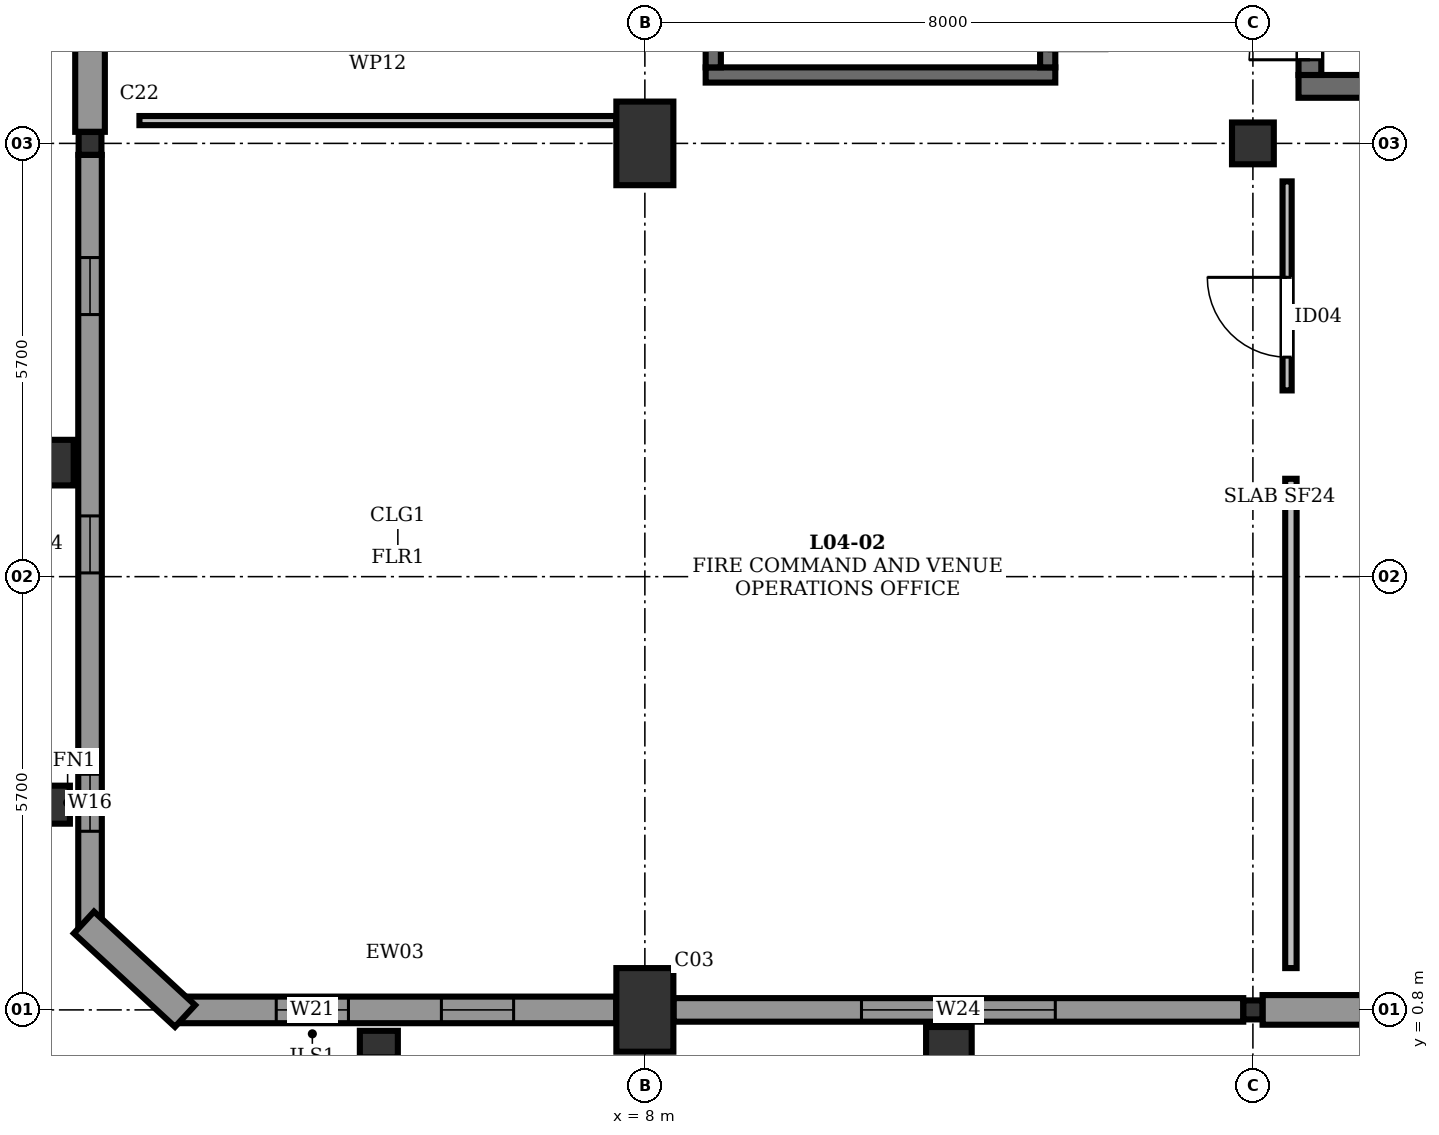
"""IFC4 building model, lengths in metres.
Left out: names, types, materials, properties, quantities, classifications, styles, units other than length and angle.
Written with IfcOpenShell. Run it as: python <this file> out.ifc"""

import sys

from ifc_helpers import new_model, si_unit, direction, frame, frame_2d, origin, origin_2d, place, context, subcontext, project, spatial, rectangle, hollow_rectangle, extrude, element, fill, save


model = new_model("IFC4")
c1 = context("Model", 3, precision=1e-05, world=origin(), true_north=direction((0.0, 1.0)))
c2 = subcontext(c1, "Body", "Model", "MODEL_VIEW")
j1 = project(units=[si_unit("LENGTHUNIT", "METRE"), si_unit("PLANEANGLEUNIT", "RADIAN")], contexts=[c1])
p1 = place(None, origin())
s1 = spatial("IfcSite", under=j1, at=p1, CompositionType="ELEMENT")
p2 = place(p1, origin())
s2 = spatial("IfcBuilding", under=s1, at=p2, CompositionType="ELEMENT")
p3 = place(p2, frame((0.0, 0.0, 19.2)))
s3 = spatial("IfcBuildingStorey", under=s2, at=p3, CompositionType="ELEMENT", Elevation=19.2)
p4 = place(p3, frame((0.7, 12.2, 0.0), z_axis=(0.0, 0.0, 1.0), x_axis=(1.0, 0.0, 0.0)))
e1 = element("IfcColumn", 1, at=p4, inside=s3, PredefinedType="COLUMN", context=c2, shape_type="SweptSolid", body=[
    extrude(hollow_rectangle(XDim=0.3, YDim=0.3, WallThickness=0.012, at=origin_2d()), origin(), (0.0, 0.0, 1.0), 4.8),
])
for number, where, z_axis, x_axis in (
    (2, (8.0, 0.8, 0.0), (0.0, 0.0, 1.0), (1.0, 0.0, 0.0)),
    (3, (8.0, 12.2, 0.0), (0.0, 0.0, 1.0), (1.0, 0.0, 0.0)),
):
    element("IfcColumn", number, at=place(p3, frame(where, z_axis=z_axis, x_axis=x_axis)), inside=s3, PredefinedType="COLUMN", context=c2, shape_type="SweptSolid", body=[
        extrude(rectangle(XDim=0.75, YDim=1.1, at=origin_2d()), origin(), (0.0, 0.0, 1.0), 4.8),
    ])
p5 = place(p3, frame((16.0, 0.8, 0.0), z_axis=(0.0, 0.0, 1.0), x_axis=(1.0, 0.0, 0.0)))
e4 = element("IfcColumn", 4, at=p5, inside=s3, PredefinedType="COLUMN", context=c2, shape_type="SweptSolid", body=[
    extrude(hollow_rectangle(XDim=0.25, YDim=0.25, WallThickness=0.012, at=origin_2d()), origin(), (0.0, 0.0, 1.0), 4.8),
])
p6 = place(p3, frame((16.0, 12.2, 0.0), z_axis=(0.0, 0.0, 1.0), x_axis=(1.0, 0.0, 0.0)))
e5 = element("IfcColumn", 5, at=p6, inside=s3, PredefinedType="COLUMN", context=c2, shape_type="SweptSolid", body=[
    extrude(rectangle(XDim=0.55, YDim=0.55, at=origin_2d()), origin(), (0.0, 0.0, 1.0), 4.8),
])
p7 = place(p3, frame((0.26, 3.5, 0.0), z_axis=(0.0, 0.0, 1.0), x_axis=(1.0, 0.0, 0.0)))
e6 = element("IfcColumn", 6, at=p7, inside=s3, PredefinedType="PILASTER", context=c2, shape_type="SweptSolid", body=[
    extrude(rectangle(XDim=0.35, YDim=0.5, at=origin_2d()), origin(), (0.0, 0.0, 1.0), 5.65),
])
p8 = place(p3, frame((0.26, 8.0, 0.0), z_axis=(0.0, 0.0, 1.0), x_axis=(1.0, 0.0, 0.0)))
e7 = element("IfcColumn", 7, at=p8, inside=s3, PredefinedType="PILASTER", context=c2, shape_type="SweptSolid", body=[
    extrude(rectangle(XDim=0.45, YDim=0.6, at=origin_2d()), origin(), (0.0, 0.0, 1.0), 5.65),
])
p9 = place(p3, frame((4.5, 0.35, 0.0), z_axis=(0.0, 0.0, 1.0), x_axis=(0.0, 1.0, 0.0)))
e8 = element("IfcColumn", 8, at=p9, inside=s3, PredefinedType="PILASTER", context=c2, shape_type="SweptSolid", body=[
    extrude(rectangle(XDim=0.35, YDim=0.5, at=origin_2d()), origin(), (0.0, 0.0, 1.0), 5.65),
])
p10 = place(p3, frame((12.0, 0.35, 0.0), z_axis=(0.0, 0.0, 1.0), x_axis=(0.0, 1.0, 0.0)))
e9 = element("IfcColumn", 9, at=p10, inside=s3, PredefinedType="PILASTER", context=c2, shape_type="SweptSolid", body=[
    extrude(rectangle(XDim=0.45, YDim=0.6, at=origin_2d()), origin(), (0.0, 0.0, 1.0), 5.65),
])
p11 = place(p3, frame((0.7, 1.8, 0.0), z_axis=(0.0, 0.0, 1.0), x_axis=(0.0, 1.0, 0.0)))
e10 = element("IfcWall", 10, at=p11, inside=s3, PredefinedType="STANDARD", context=c2, shape_type="SweptSolid", body=[
    extrude(rectangle(XDim=10.248, YDim=0.31, at=frame_2d((5.124, 0.0))), origin(), (0.0, 0.0, 1.0), 3.645),
])
p12 = place(p11, frame((1.35, 0.0, 0.75)))
e11 = element("IfcOpeningElement", 11, at=p12, cuts=e10, PredefinedType="OPENING", context=c2, shape_type="SweptSolid", body=[
    extrude(rectangle(XDim=0.75, YDim=2.35, at=frame_2d((0.375, 1.175))), frame((0.0, 0.167, 0.0), z_axis=(0.0, -1.0, 0.0), x_axis=(1.0, 0.0, 0.0)), (0.0, 0.0, 1.0), 0.334),
])
p13 = place(p11, frame((4.749, 0.0, 0.75)))
e12 = element("IfcOpeningElement", 12, at=p13, cuts=e10, PredefinedType="OPENING", context=c2, shape_type="SweptSolid", body=[
    extrude(rectangle(XDim=0.75, YDim=2.35, at=frame_2d((0.375, 1.175))), frame((0.0, 0.167, 0.0), z_axis=(0.0, -1.0, 0.0), x_axis=(1.0, 0.0, 0.0)), (0.0, 0.0, 1.0), 0.334),
])
p14 = place(p11, frame((8.148, 0.0, 0.75)))
e13 = element("IfcOpeningElement", 13, at=p14, cuts=e10, PredefinedType="OPENING", context=c2, shape_type="SweptSolid", body=[
    extrude(rectangle(XDim=0.75, YDim=2.35, at=frame_2d((0.375, 1.175))), frame((0.0, 0.167, 0.0), z_axis=(0.0, -1.0, 0.0), x_axis=(1.0, 0.0, 0.0)), (0.0, 0.0, 1.0), 0.334),
])
p15 = place(p3, frame((0.7, 12.352, 0.0), z_axis=(0.0, 0.0, 1.0), x_axis=(0.0, 1.0, 0.0)))
e14 = element("IfcWall", 14, at=p15, inside=s3, PredefinedType="STANDARD", context=c2, shape_type="SweptSolid", body=[
    extrude(rectangle(XDim=10.048, YDim=0.39, at=frame_2d((5.024, 0.0))), origin(), (0.0, 0.0, 1.0), 3.645),
])
p16 = place(p15, frame((1.35, 0.0, 0.75)))
e15 = element("IfcOpeningElement", 15, at=p16, cuts=e14, PredefinedType="OPENING", context=c2, shape_type="SweptSolid", body=[
    extrude(rectangle(XDim=2.75, YDim=2.35, at=frame_2d((1.375, 1.175))), frame((0.0, 0.207, 0.0), z_axis=(0.0, -1.0, 0.0), x_axis=(1.0, 0.0, 0.0)), (0.0, 0.0, 1.0), 0.414),
])
p17 = place(p15, frame((5.948, 0.0, 0.75)))
e16 = element("IfcOpeningElement", 16, at=p17, cuts=e14, PredefinedType="OPENING", context=c2, shape_type="SweptSolid", body=[
    extrude(rectangle(XDim=2.75, YDim=2.35, at=frame_2d((1.375, 1.175))), frame((0.0, 0.207, 0.0), z_axis=(0.0, -1.0, 0.0), x_axis=(1.0, 0.0, 0.0)), (0.0, 0.0, 1.0), 0.414),
])
p18 = place(p3, frame((1.8, 0.8, 0.0), z_axis=(0.0, 0.0, 1.0), x_axis=(1.0, 0.0, 0.0)))
e17 = element("IfcWall", 17, at=p18, inside=s3, PredefinedType="STANDARD", context=c2, shape_type="SweptSolid", body=[
    extrude(rectangle(XDim=5.823, YDim=0.35, at=frame_2d((2.912, 0.0))), origin(), (0.0, 0.0, 1.0), 3.845),
])
p19 = place(p18, frame((1.35, 0.0, 0.75)))
e18 = element("IfcOpeningElement", 18, at=p19, cuts=e17, PredefinedType="OPENING", context=c2, shape_type="SweptSolid", body=[
    extrude(rectangle(XDim=0.95, YDim=1.55, at=frame_2d((0.475, 0.775))), frame((0.0, 0.187, 0.0), z_axis=(0.0, -1.0, 0.0), x_axis=(1.0, 0.0, 0.0)), (0.0, 0.0, 1.0), 0.374),
])
p20 = place(p18, frame((3.523, 0.0, 0.75)))
e19 = element("IfcOpeningElement", 19, at=p20, cuts=e17, PredefinedType="OPENING", context=c2, shape_type="SweptSolid", body=[
    extrude(rectangle(XDim=0.95, YDim=1.55, at=frame_2d((0.475, 0.775))), frame((0.0, 0.187, 0.0), z_axis=(0.0, -1.0, 0.0), x_axis=(1.0, 0.0, 0.0)), (0.0, 0.0, 1.0), 0.374),
])
p21 = place(p3, frame((8.377, 0.8, 0.0), z_axis=(0.0, 0.0, 1.0), x_axis=(1.0, 0.0, 0.0)))
e20 = element("IfcWall", 20, at=p21, inside=s3, PredefinedType="STANDARD", context=c2, shape_type="SweptSolid", body=[
    extrude(rectangle(XDim=7.496, YDim=0.31, at=frame_2d((3.748, 0.0))), origin(), (0.0, 0.0, 1.0), 3.845),
])
p22 = place(p21, frame((2.473, 0.0, 0.75)))
e21 = element("IfcOpeningElement", 21, at=p22, cuts=e20, PredefinedType="OPENING", context=c2, shape_type="SweptSolid", body=[
    extrude(rectangle(XDim=2.55, YDim=1.55, at=frame_2d((1.275, 0.775))), frame((0.0, 0.167, 0.0), z_axis=(0.0, -1.0, 0.0), x_axis=(1.0, 0.0, 0.0)), (0.0, 0.0, 1.0), 0.334),
])
p23 = place(p3, frame((16.127, 0.8, 0.0), z_axis=(0.0, 0.0, 1.0), x_axis=(1.0, 0.0, 0.0)))
e22 = element("IfcWall", 22, at=p23, inside=s3, PredefinedType="STANDARD", context=c2, shape_type="SweptSolid", body=[
    extrude(rectangle(XDim=7.496, YDim=0.39, at=frame_2d((3.748, 0.0))), origin(), (0.0, 0.0, 1.0), 3.845),
])
p24 = place(p23, frame((1.35, 0.0, 0.75)))
e23 = element("IfcOpeningElement", 23, at=p24, cuts=e22, PredefinedType="OPENING", context=c2, shape_type="SweptSolid", body=[
    extrude(rectangle(XDim=1.85, YDim=2.5, at=frame_2d((0.925, 1.25))), frame((0.0, 0.207, 0.0), z_axis=(0.0, -1.0, 0.0), x_axis=(1.0, 0.0, 0.0)), (0.0, 0.0, 1.0), 0.414),
])
p25 = place(p23, frame((4.296, 0.0, 0.75)))
e24 = element("IfcOpeningElement", 24, at=p25, cuts=e22, PredefinedType="OPENING", context=c2, shape_type="SweptSolid", body=[
    extrude(rectangle(XDim=1.85, YDim=2.5, at=frame_2d((0.925, 1.25))), frame((0.0, 0.207, 0.0), z_axis=(0.0, -1.0, 0.0), x_axis=(1.0, 0.0, 0.0)), (0.0, 0.0, 1.0), 0.414),
])
p26 = place(p3, frame((0.62, 1.95, 0.0), z_axis=(0.0, 0.0, 1.0), x_axis=(0.734131351327, -0.679007480812, 0.0)))
e25 = element("IfcWall", 25, at=p26, inside=s3, PredefinedType="STANDARD", context=c2, shape_type="SweptSolid", body=[
    extrude(rectangle(XDim=1.812, YDim=0.39, at=frame_2d((0.906, 0.0))), origin(), (0.0, 0.0, 1.0), 4.4),
])
p27 = place(p3, frame((16.6, 12.95, 0.0), z_axis=(0.0, 0.0, 1.0), x_axis=(1.0, 0.0, 0.0)))
e26 = element("IfcWall", 26, at=p27, inside=s3, PredefinedType="SHEAR", context=c2, shape_type="SweptSolid", body=[
    extrude(rectangle(XDim=6.8, YDim=0.3, at=frame_2d((3.4, 0.0))), origin(), (0.0, 0.0, 1.0), 4.56),
])
p28 = place(p3, frame((16.75, 13.1, 0.0), z_axis=(0.0, 0.0, 1.0), x_axis=(0.0, 1.0, 0.0)))
e27 = element("IfcWall", 27, at=p28, inside=s3, PredefinedType="SHEAR", context=c2, shape_type="SweptSolid", body=[
    extrude(rectangle(XDim=9.6, YDim=0.3, at=frame_2d((4.8, 0.0))), origin(), (0.0, 0.0, 1.0), 4.56),
])
p29 = place(p28, frame((0.2, 0.0, 0.0)))
e28 = element("IfcOpeningElement", 28, at=p29, cuts=e27, PredefinedType="OPENING", context=c2, shape_type="SweptSolid", body=[
    extrude(rectangle(XDim=1.6, YDim=2.2, at=frame_2d((0.8, 1.1))), frame((0.0, 0.162, 0.0), z_axis=(0.0, -1.0, 0.0), x_axis=(1.0, 0.0, 0.0)), (0.0, 0.0, 1.0), 0.324),
])
p30 = place(p3, frame((8.8, 13.1, 0.0), z_axis=(0.0, 0.0, 1.0), x_axis=(1.0, 0.0, 0.0)))
e29 = element("IfcWall", 29, at=p30, inside=s3, PredefinedType="SOLIDWALL", context=c2, shape_type="SweptSolid", body=[
    extrude(rectangle(XDim=4.6, YDim=0.2, at=frame_2d((2.3, 0.0))), origin(), (0.0, 0.0, 1.0), 4.56),
])
p31 = place(p3, frame((8.9, 13.2, 0.0), z_axis=(0.0, 0.0, 1.0), x_axis=(0.0, 1.0, 0.0)))
e30 = element("IfcWall", 30, at=p31, inside=s3, PredefinedType="SOLIDWALL", context=c2, shape_type="SweptSolid", body=[
    extrude(rectangle(XDim=8.8, YDim=0.2, at=frame_2d((4.4, 0.0))), origin(), (0.0, 0.0, 1.0), 4.56),
])
p32 = place(p3, frame((13.3, 13.2, 0.0), z_axis=(0.0, 0.0, 1.0), x_axis=(0.0, 1.0, 0.0)))
e31 = element("IfcWall", 31, at=p32, inside=s3, PredefinedType="SOLIDWALL", context=c2, shape_type="SweptSolid", body=[
    extrude(rectangle(XDim=8.8, YDim=0.2, at=frame_2d((4.4, 0.0))), origin(), (0.0, 0.0, 1.0), 4.56),
])
p33 = place(p32, frame((0.22, 0.0, 0.0)))
e32 = element("IfcOpeningElement", 32, at=p33, cuts=e31, PredefinedType="OPENING", context=c2, shape_type="SweptSolid", body=[
    extrude(rectangle(XDim=1.6, YDim=2.2, at=frame_2d((0.8, 1.1))), frame((0.0, 0.112, 0.0), z_axis=(0.0, -1.0, 0.0), x_axis=(1.0, 0.0, 0.0)), (0.0, 0.0, 1.0), 0.224),
])
p34 = place(p3, frame((16.45, 8.95, 0.0), z_axis=(0.0, 0.0, 1.0), x_axis=(0.0, 1.0, 0.0)))
e33 = element("IfcWall", 33, at=p34, inside=s3, PredefinedType="PARTITIONING", context=c2, shape_type="SweptSolid", body=[
    extrude(rectangle(XDim=2.75, YDim=0.12, at=frame_2d((1.375, 0.0))), origin(), (0.0, 0.0, 1.0), 3.845),
])
p35 = place(p34, frame((0.438, 0.0, 0.0)))
e34 = element("IfcOpeningElement", 34, at=p35, cuts=e33, PredefinedType="OPENING", context=c2, shape_type="SweptSolid", body=[
    extrude(rectangle(XDim=1.05, YDim=2.15, at=frame_2d((0.525, 1.075))), frame((0.0, 0.072, 0.0), z_axis=(0.0, -1.0, 0.0), x_axis=(1.0, 0.0, 0.0)), (0.0, 0.0, 1.0), 0.144),
])
p36 = place(p3, frame((1.35, 12.5, 0.0), z_axis=(0.0, 0.0, 1.0), x_axis=(1.0, 0.0, 0.0)))
e35 = element("IfcWall", 35, at=p36, inside=s3, PredefinedType="PARTITIONING", context=c2, shape_type="SweptSolid", body=[
    extrude(rectangle(XDim=6.273, YDim=0.12, at=frame_2d((3.136, 0.0))), origin(), (0.0, 0.0, 1.0), 3.645),
])
p37 = place(p3, frame((16.5, 1.35, 0.0), z_axis=(0.0, 0.0, 1.0), x_axis=(0.0, 1.0, 0.0)))
e36 = element("IfcWall", 36, at=p37, inside=s3, PredefinedType="PARTITIONING", context=c2, shape_type="SweptSolid", body=[
    extrude(rectangle(XDim=6.438, YDim=0.15, at=frame_2d((3.219, 0.0))), origin(), (0.0, 0.0, 1.0), 4.56),
])
p38 = place(p12, origin())
e37 = element("IfcWindow", 37, at=p38, inside=s3, PartitioningType="SINGLE_PANEL", PredefinedType="WINDOW", context=c2, shape_type="SweptSolid", body=[
    extrude(rectangle(XDim=0.75, YDim=2.35, at=frame_2d((0.375, 1.175))), frame((0.0, 0.08, 0.0), z_axis=(0.0, -1.0, 0.0), x_axis=(1.0, 0.0, 0.0)), (0.0, 0.0, 1.0), 0.06),
])
fill(e11, e37)
p39 = place(p13, origin())
e38 = element("IfcWindow", 38, at=p39, inside=s3, PartitioningType="SINGLE_PANEL", PredefinedType="WINDOW", context=c2, shape_type="SweptSolid", body=[
    extrude(rectangle(XDim=0.75, YDim=2.35, at=frame_2d((0.375, 1.175))), frame((0.0, 0.08, 0.0), z_axis=(0.0, -1.0, 0.0), x_axis=(1.0, 0.0, 0.0)), (0.0, 0.0, 1.0), 0.06),
])
fill(e12, e38)
p40 = place(p14, origin())
e39 = element("IfcWindow", 39, at=p40, inside=s3, PartitioningType="SINGLE_PANEL", PredefinedType="WINDOW", context=c2, shape_type="SweptSolid", body=[
    extrude(rectangle(XDim=0.75, YDim=2.35, at=frame_2d((0.375, 1.175))), frame((0.0, 0.08, 0.0), z_axis=(0.0, -1.0, 0.0), x_axis=(1.0, 0.0, 0.0)), (0.0, 0.0, 1.0), 0.06),
])
fill(e13, e39)
p41 = place(p19, origin())
e40 = element("IfcWindow", 40, at=p41, inside=s3, PartitioningType="SINGLE_PANEL", PredefinedType="WINDOW", context=c2, shape_type="SweptSolid", body=[
    extrude(rectangle(XDim=0.95, YDim=1.55, at=frame_2d((0.475, 0.775))), frame((0.0, 0.08, 0.0), z_axis=(0.0, -1.0, 0.0), x_axis=(1.0, 0.0, 0.0)), (0.0, 0.0, 1.0), 0.06),
])
fill(e18, e40)
p42 = place(p20, origin())
e41 = element("IfcWindow", 41, at=p42, inside=s3, PartitioningType="SINGLE_PANEL", PredefinedType="WINDOW", context=c2, shape_type="SweptSolid", body=[
    extrude(rectangle(XDim=0.95, YDim=1.55, at=frame_2d((0.475, 0.775))), frame((0.0, 0.08, 0.0), z_axis=(0.0, -1.0, 0.0), x_axis=(1.0, 0.0, 0.0)), (0.0, 0.0, 1.0), 0.06),
])
fill(e19, e41)
p43 = place(p22, origin())
e42 = element("IfcWindow", 42, at=p43, inside=s3, PartitioningType="TRIPLE_PANEL_VERTICAL", PredefinedType="WINDOW", context=c2, shape_type="SweptSolid", body=[
    extrude(rectangle(XDim=2.55, YDim=1.55, at=frame_2d((1.275, 0.775))), frame((0.0, 0.08, 0.0), z_axis=(0.0, -1.0, 0.0), x_axis=(1.0, 0.0, 0.0)), (0.0, 0.0, 1.0), 0.06),
])
fill(e21, e42)
p44 = place(p2, frame((0.0, 0.0, 27.0)))
p45 = place(p44, frame((0.0, 0.0, -3.24)))
p46 = place(p45, frame((10.0, 6.4, 0.0)))
p47 = place(p46, frame((0.0, 0.0, 0.19)))
e43 = element("IfcWindow", 43, at=p47, inside=s3, PartitioningType="SINGLE_PANEL", PredefinedType="SKYLIGHT", context=c2, shape_type="SweptSolid", body=[
    extrude(rectangle(XDim=2.2, YDim=3.4, at=origin_2d()), origin(), (0.0, 0.0, 1.0), 0.05),
])
p48 = place(p29, origin())
e44 = element("IfcDoor", 44, at=p48, inside=s3, OperationType="DOUBLE_DOOR_SINGLE_SWING", PredefinedType="DOOR", context=c2, shape_type="SweptSolid", body=[
    extrude(rectangle(XDim=1.6, YDim=2.2, at=frame_2d((0.8, 1.1))), frame((0.0, 0.025, 0.0), z_axis=(0.0, -1.0, 0.0), x_axis=(1.0, 0.0, 0.0)), (0.0, 0.0, 1.0), 0.05),
])
fill(e28, e44)
p49 = place(p35, origin())
e45 = element("IfcDoor", 45, at=p49, inside=s3, OperationType="SINGLE_SWING_RIGHT", PredefinedType="DOOR", context=c2, shape_type="SweptSolid", body=[
    extrude(rectangle(XDim=1.05, YDim=2.15, at=frame_2d((0.525, 1.075))), frame((0.0, 0.025, 0.0), z_axis=(0.0, -1.0, 0.0), x_axis=(1.0, 0.0, 0.0)), (0.0, 0.0, 1.0), 0.05),
])
fill(e34, e45)
save(model, sys.argv[1])
